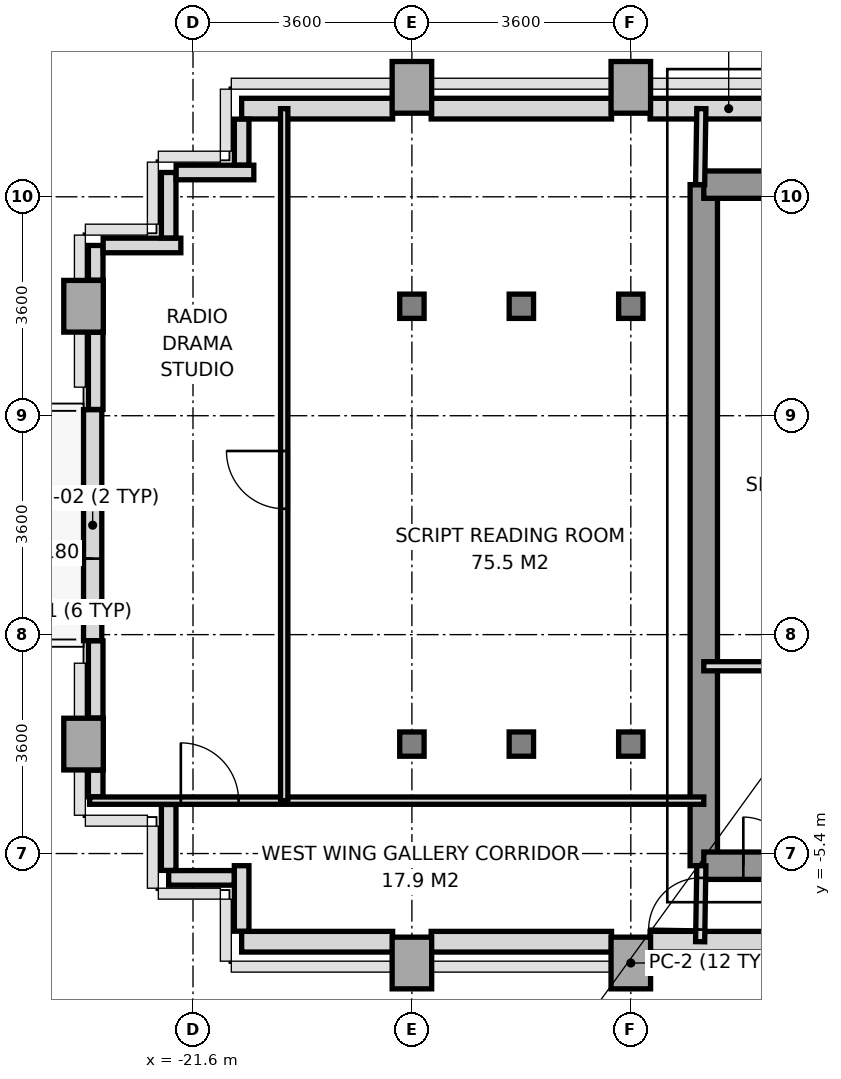
"""IFC4 building model, lengths in metres.
Left out: names, types, materials, properties, quantities, classifications, styles, units other than length and angle.
Written with IfcOpenShell. Run it as: python <this file> out.ifc"""

import sys

from ifc_helpers import new_model, si_unit, direction, frame, frame_2d, origin, origin_2d, place, context, subcontext, project, spatial, rectangle, i_section, extrude, source, transform, mapped, element, fill, save


model = new_model("IFC4")
c1 = context("Model", 3, precision=1e-05, world=origin(), true_north=direction((0.0, 1.0)))
c2 = subcontext(c1, "Body", "Model", "MODEL_VIEW")
j1 = project(units=[si_unit("LENGTHUNIT", "METRE"), si_unit("PLANEANGLEUNIT", "RADIAN")], contexts=[c1])
p1 = place(None, origin())
s1 = spatial("IfcSite", under=j1, at=p1, CompositionType="ELEMENT")
p2 = place(p1, origin())
s2 = spatial("IfcBuilding", under=s1, at=p2, CompositionType="ELEMENT")
p3 = place(p2, frame((0.0, 0.0, 107.4)))
s3 = spatial("IfcBuildingStorey", under=s2, at=p3, CompositionType="ELEMENT", Elevation=107.4)
m1 = source(origin(), c2, "Body", "SweptSolid", [
    extrude(rectangle(XDim=0.65, YDim=0.85, at=origin_2d()), origin(), (0.0, 0.0, 1.0), 3.2),
])
for number, where, z_axis, x_axis in (
    (1, (-23.4, -3.6, 0.0), (0.0, 0.0, 1.0), (1.0, 0.0, 0.0)),
    (2, (-23.4, 3.6, 0.0), (0.0, 0.0, 1.0), (1.0, 0.0, 0.0)),
    (3, (-18.0, -7.2, 0.0), (0.0, 0.0, 1.0), (1.0, 0.0, 0.0)),
):
    element("IfcColumn", number, at=place(p3, frame(where, z_axis=z_axis, x_axis=x_axis)), inside=s3, PredefinedType="COLUMN", context=c2, shape_type="MappedRepresentation", body=[
        mapped(m1, transform((0.0, 0.0, 0.0), x_axis=(1.0, 0.0, 0.0), y_axis=(0.0, 1.0, 0.0), z_axis=(0.0, 0.0, 1.0), scale=1.0)),
    ])
m2 = source(origin(), c2, "Body", "SweptSolid", [
    extrude(i_section(OverallWidth=0.401, OverallDepth=0.399, WebThickness=0.02, FlangeThickness=0.032, at=origin_2d()), origin(), (0.0, 0.0, 1.0), 3.2),
])
for number, where, z_axis, x_axis in (
    (4, (-18.0, -3.6, 0.0), (0.0, 0.0, 1.0), (1.0, 0.0, 0.0)),
    (5, (-18.0, 3.6, 0.0), (0.0, 0.0, 1.0), (1.0, 0.0, 0.0)),
):
    element("IfcColumn", number, at=place(p3, frame(where, z_axis=z_axis, x_axis=x_axis)), inside=s3, PredefinedType="COLUMN", context=c2, shape_type="MappedRepresentation", body=[
        mapped(m2, transform((0.0, 0.0, 0.0), x_axis=(1.0, 0.0, 0.0), y_axis=(0.0, 1.0, 0.0), z_axis=(0.0, 0.0, 1.0), scale=1.0)),
    ])
p4 = place(p3, frame((-18.0, 7.2, 0.0), z_axis=(0.0, 0.0, 1.0), x_axis=(1.0, 0.0, 0.0)))
e6 = element("IfcColumn", 6, at=p4, inside=s3, PredefinedType="COLUMN", context=c2, shape_type="MappedRepresentation", body=[
    mapped(m1, transform((0.0, 0.0, 0.0), x_axis=(1.0, 0.0, 0.0), y_axis=(0.0, 1.0, 0.0), z_axis=(0.0, 0.0, 1.0), scale=1.0)),
])
for number, where, z_axis, x_axis in (
    (7, (-16.2, -3.6, 0.0), (0.0, 0.0, 1.0), (1.0, 0.0, 0.0)),
    (8, (-16.2, 3.6, 0.0), (0.0, 0.0, 1.0), (1.0, 0.0, 0.0)),
):
    element("IfcColumn", number, at=place(p3, frame(where, z_axis=z_axis, x_axis=x_axis)), inside=s3, PredefinedType="COLUMN", context=c2, shape_type="MappedRepresentation", body=[
        mapped(m2, transform((0.0, 0.0, 0.0), x_axis=(1.0, 0.0, 0.0), y_axis=(0.0, 1.0, 0.0), z_axis=(0.0, 0.0, 1.0), scale=1.0)),
    ])
p5 = place(p3, frame((-14.4, -7.2, 0.0), z_axis=(0.0, 0.0, 1.0), x_axis=(1.0, 0.0, 0.0)))
e9 = element("IfcColumn", 9, at=p5, inside=s3, PredefinedType="COLUMN", context=c2, shape_type="MappedRepresentation", body=[
    mapped(m1, transform((0.0, 0.0, 0.0), x_axis=(1.0, 0.0, 0.0), y_axis=(0.0, 1.0, 0.0), z_axis=(0.0, 0.0, 1.0), scale=1.0)),
])
for number, where, z_axis, x_axis in (
    (10, (-14.4, -3.6, 0.0), (0.0, 0.0, 1.0), (1.0, 0.0, 0.0)),
    (11, (-14.4, 3.6, 0.0), (0.0, 0.0, 1.0), (1.0, 0.0, 0.0)),
):
    element("IfcColumn", number, at=place(p3, frame(where, z_axis=z_axis, x_axis=x_axis)), inside=s3, PredefinedType="COLUMN", context=c2, shape_type="MappedRepresentation", body=[
        mapped(m2, transform((0.0, 0.0, 0.0), x_axis=(1.0, 0.0, 0.0), y_axis=(0.0, 1.0, 0.0), z_axis=(0.0, 0.0, 1.0), scale=1.0)),
    ])
p6 = place(p3, frame((-14.4, 7.2, 0.0), z_axis=(0.0, 0.0, 1.0), x_axis=(1.0, 0.0, 0.0)))
e12 = element("IfcColumn", 12, at=p6, inside=s3, PredefinedType="COLUMN", context=c2, shape_type="MappedRepresentation", body=[
    mapped(m1, transform((0.0, 0.0, 0.0), x_axis=(1.0, 0.0, 0.0), y_axis=(0.0, 1.0, 0.0), z_axis=(0.0, 0.0, 1.0), scale=1.0)),
])
p7 = place(p3, frame((-20.8, 6.85, 0.0), z_axis=(0.0, 0.0, 1.0), x_axis=(1.0, 0.0, 0.0)))
e13 = element("IfcWall", 13, at=p7, inside=s3, PredefinedType="SOLIDWALL", context=c2, shape_type="SweptSolid", body=[
    extrude(rectangle(XDim=2.483, YDim=0.34, at=frame_2d((1.242, 0.0))), origin(), (0.0, 0.0, 1.0), 3.2),
])
p8 = place(p3, frame((-17.683, 6.85, 0.0), z_axis=(0.0, 0.0, 1.0), x_axis=(1.0, 0.0, 0.0)))
e14 = element("IfcWall", 14, at=p8, inside=s3, PredefinedType="SOLIDWALL", context=c2, shape_type="SweptSolid", body=[
    extrude(rectangle(XDim=2.966, YDim=0.34, at=frame_2d((1.483, 0.0))), origin(), (0.0, 0.0, 1.0), 2.45),
])
p9 = place(p3, frame((-14.083, 6.85, 0.0), z_axis=(0.0, 0.0, 1.0), x_axis=(1.0, 0.0, 0.0)))
e15 = element("IfcWall", 15, at=p9, inside=s3, PredefinedType="SOLIDWALL", context=c2, shape_type="SweptSolid", body=[
    extrude(rectangle(XDim=2.585, YDim=0.34, at=frame_2d((1.292, 0.0))), origin(), (0.0, 0.0, 1.0), 3.2),
])
p10 = place(p3, frame((-20.8, -6.85, 0.0), z_axis=(0.0, 0.0, 1.0), x_axis=(1.0, 0.0, 0.0)))
e16 = element("IfcWall", 16, at=p10, inside=s3, PredefinedType="SOLIDWALL", context=c2, shape_type="SweptSolid", body=[
    extrude(rectangle(XDim=2.483, YDim=0.34, at=frame_2d((1.242, 0.0))), origin(), (0.0, 0.0, 1.0), 3.2),
])
p11 = place(p3, frame((-17.683, -6.85, 0.0), z_axis=(0.0, 0.0, 1.0), x_axis=(1.0, 0.0, 0.0)))
e17 = element("IfcWall", 17, at=p11, inside=s3, PredefinedType="SOLIDWALL", context=c2, shape_type="SweptSolid", body=[
    extrude(rectangle(XDim=2.966, YDim=0.34, at=frame_2d((1.483, 0.0))), origin(), (0.0, 0.0, 1.0), 2.45),
])
p12 = place(p3, frame((-14.083, -6.85, 0.0), z_axis=(0.0, 0.0, 1.0), x_axis=(1.0, 0.0, 0.0)))
e18 = element("IfcWall", 18, at=p12, inside=s3, PredefinedType="SOLIDWALL", context=c2, shape_type="SweptSolid", body=[
    extrude(rectangle(XDim=2.333, YDim=0.34, at=frame_2d((1.167, 0.0))), origin(), (0.0, 0.0, 1.0), 3.2),
])
p13 = place(p3, frame((-23.25, -1.9, 0.0), z_axis=(0.0, 0.0, 1.0), x_axis=(0.0, 1.0, 0.0)))
e19 = element("IfcWall", 19, at=p13, inside=s3, PredefinedType="SOLIDWALL", context=c2, shape_type="SweptSolid", body=[
    extrude(rectangle(XDim=3.8, YDim=0.3, at=frame_2d((1.9, 0.0))), origin(), (0.0, 0.0, 1.0), 2.45),
])
p14 = place(p13, frame((1.35, 0.0, 0.0)))
e20 = element("IfcOpeningElement", 20, at=p14, cuts=e19, PredefinedType="OPENING", context=c2, shape_type="SweptSolid", body=[
    extrude(rectangle(XDim=1.1, YDim=2.3, at=frame_2d((0.55, 1.15))), frame((0.0, 0.16, 0.0), z_axis=(0.0, -1.0, 0.0), x_axis=(1.0, 0.0, 0.0)), (0.0, 0.0, 1.0), 0.32),
])
for number, where, z_axis, x_axis in (
    (21, (-20.8, -6.677, 0.0), (0.0, 0.0, 1.0), (0.0, 1.0, 0.0)),
    (22, (-20.923, -5.8, 0.0), (0.0, 0.0, 1.0), (-1.0, 0.0, 0.0)),
):
    element("IfcWall", number, at=place(p3, frame(where, z_axis=z_axis, x_axis=x_axis)), inside=s3, PredefinedType="PARAPET", context=c2, shape_type="SweptSolid", body=[
        extrude(rectangle(XDim=1.077, YDim=0.24, at=frame_2d((0.539, 0.0))), origin(), (0.0, 0.0, 1.0), 1.15),
    ])
p15 = place(p3, frame((-22.0, -5.677, 0.0), z_axis=(0.0, 0.0, 1.0), x_axis=(0.0, 1.0, 0.0)))
e23 = element("IfcWall", 23, at=p15, inside=s3, PredefinedType="PARAPET", context=c2, shape_type="SweptSolid", body=[
    extrude(rectangle(XDim=1.084, YDim=0.24, at=frame_2d((0.542, 0.0))), origin(), (0.0, 0.0, 1.0), 1.15),
])
p16 = place(p3, frame((-23.2, -4.467, 0.0), z_axis=(0.0, 0.0, 1.0), x_axis=(0.0, 1.0, 0.0)))
e24 = element("IfcWall", 24, at=p16, inside=s3, PredefinedType="PARAPET", context=c2, shape_type="SweptSolid", body=[
    extrude(rectangle(XDim=0.439, YDim=0.24, at=frame_2d((0.219, 0.0))), origin(), (0.0, 0.0, 1.0), 1.15),
])
for number, where, z_axis, x_axis in (
    (25, (-23.2, -3.172, 0.0), (0.0, 0.0, 1.0), (0.0, 1.0, 0.0)),
    (26, (-23.2, 1.903, 0.0), (0.0, 0.0, 1.0), (0.0, 1.0, 0.0)),
):
    element("IfcWall", number, at=place(p3, frame(where, z_axis=z_axis, x_axis=x_axis)), inside=s3, PredefinedType="PARAPET", context=c2, shape_type="SweptSolid", body=[
        extrude(rectangle(XDim=1.269, YDim=0.24, at=frame_2d((0.635, 0.0))), origin(), (0.0, 0.0, 1.0), 1.15),
    ])
p17 = place(p3, frame((-23.2, 4.028, 0.0), z_axis=(0.0, 0.0, 1.0), x_axis=(0.0, 1.0, 0.0)))
e27 = element("IfcWall", 27, at=p17, inside=s3, PredefinedType="PARAPET", context=c2, shape_type="SweptSolid", body=[
    extrude(rectangle(XDim=0.572, YDim=0.24, at=frame_2d((0.286, 0.0))), origin(), (0.0, 0.0, 1.0), 1.15),
])
p18 = place(p3, frame((-23.077, 4.6, 0.0), z_axis=(0.0, 0.0, 1.0), x_axis=(1.0, 0.0, 0.0)))
e28 = element("IfcWall", 28, at=p18, inside=s3, PredefinedType="PARAPET", context=c2, shape_type="SweptSolid", body=[
    extrude(rectangle(XDim=1.277, YDim=0.24, at=frame_2d((0.638, 0.0))), origin(), (0.0, 0.0, 1.0), 1.15),
])
p19 = place(p3, frame((-22.0, 4.723, 0.0), z_axis=(0.0, 0.0, 1.0), x_axis=(0.0, 1.0, 0.0)))
e29 = element("IfcWall", 29, at=p19, inside=s3, PredefinedType="PARAPET", context=c2, shape_type="SweptSolid", body=[
    extrude(rectangle(XDim=1.077, YDim=0.24, at=frame_2d((0.539, 0.0))), origin(), (0.0, 0.0, 1.0), 1.15),
])
p20 = place(p3, frame((-21.877, 5.8, 0.0), z_axis=(0.0, 0.0, 1.0), x_axis=(1.0, 0.0, 0.0)))
e30 = element("IfcWall", 30, at=p20, inside=s3, PredefinedType="PARAPET", context=c2, shape_type="SweptSolid", body=[
    extrude(rectangle(XDim=1.277, YDim=0.24, at=frame_2d((0.638, 0.0))), origin(), (0.0, 0.0, 1.0), 1.15),
])
p21 = place(p3, frame((-20.8, 5.923, 0.0), z_axis=(0.0, 0.0, 1.0), x_axis=(0.0, 1.0, 0.0)))
e31 = element("IfcWall", 31, at=p21, inside=s3, PredefinedType="PARAPET", context=c2, shape_type="SweptSolid", body=[
    extrude(rectangle(XDim=0.754, YDim=0.24, at=frame_2d((0.377, 0.0))), origin(), (0.0, 0.0, 1.0), 1.15),
])
p22 = place(p3, frame((-13.2, -5.6, 0.0), z_axis=(0.0, 0.0, 1.0), x_axis=(0.0, 1.0, 0.0)))
e32 = element("IfcWall", 32, at=p22, inside=s3, PredefinedType="SHEAR", context=c2, shape_type="SweptSolid", body=[
    extrude(rectangle(XDim=11.2, YDim=0.45, at=frame_2d((5.6, 0.0))), origin(), (0.0, 0.0, 1.0), 3.2),
])
p23 = place(p3, frame((-13.2, 5.6, 0.0), z_axis=(0.0, 0.0, 1.0), x_axis=(1.0, 0.0, 0.0)))
e33 = element("IfcWall", 33, at=p23, inside=s3, PredefinedType="SHEAR", context=c2, shape_type="SweptSolid", body=[
    extrude(rectangle(XDim=1.819, YDim=0.45, at=frame_2d((0.909, 0.0))), origin(), (0.0, 0.0, 1.0), 3.2),
])
p24 = place(p3, frame((-13.2, -5.6, 0.0), z_axis=(0.0, 0.0, 1.0), x_axis=(1.0, 0.0, 0.0)))
e34 = element("IfcWall", 34, at=p24, inside=s3, PredefinedType="SHEAR", context=c2, shape_type="SweptSolid", body=[
    extrude(rectangle(XDim=7.8, YDim=0.45, at=frame_2d((3.9, 0.0))), origin(), (0.0, 0.0, 1.0), 3.2),
])
p25 = place(p24, frame((3.6, 0.0, 0.0)))
e35 = element("IfcOpeningElement", 35, at=p25, cuts=e34, PredefinedType="OPENING", context=c2, shape_type="SweptSolid", body=[
    extrude(rectangle(XDim=1.2, YDim=2.2, at=frame_2d((0.6, 1.1))), frame((0.0, 0.235, 0.0), z_axis=(0.0, -1.0, 0.0), x_axis=(1.0, 0.0, 0.0)), (0.0, 0.0, 1.0), 0.47),
])
p26 = place(p24, frame((0.65, 0.0, 0.0)))
e36 = element("IfcOpeningElement", 36, at=p26, cuts=e34, PredefinedType="OPENING", context=c2, shape_type="SweptSolid", body=[
    extrude(rectangle(XDim=0.8, YDim=2.1, at=frame_2d((0.4, 1.05))), frame((0.0, 0.235, 0.0), z_axis=(0.0, -1.0, 0.0), x_axis=(1.0, 0.0, 0.0)), (0.0, 0.0, 1.0), 0.47),
])
p27 = place(p3, frame((-13.2, -2.32, 0.0), z_axis=(0.0, 0.0, 1.0), x_axis=(1.0, 0.0, 0.0)))
e37 = element("IfcWall", 37, at=p27, inside=s3, PredefinedType="PARTITIONING", context=c2, shape_type="SweptSolid", body=[
    extrude(rectangle(XDim=2.18, YDim=0.15, at=frame_2d((1.09, 0.0))), origin(), (0.0, 0.0, 1.0), 3.2),
])
p28 = place(p3, frame((-13.26, 5.6, 0.0), z_axis=(0.0, 0.0, 1.0), x_axis=(0.016013571389, 0.999871774545, 0.0)))
e38 = element("IfcWall", 38, at=p28, inside=s3, PredefinedType="PARTITIONING", context=c2, shape_type="SweptSolid", body=[
    extrude(rectangle(XDim=1.25, YDim=0.15, at=frame_2d((0.625, 0.0))), origin(), (0.0, 0.0, 1.0), 3.2),
])
p29 = place(p3, frame((-13.26, -6.85, 0.0), z_axis=(0.0, 0.0, 1.0), x_axis=(0.016013571389, 0.999871774545, 0.0)))
e39 = element("IfcWall", 39, at=p29, inside=s3, PredefinedType="PARTITIONING", context=c2, shape_type="SweptSolid", body=[
    extrude(rectangle(XDim=1.25, YDim=0.15, at=frame_2d((0.625, 0.0))), origin(), (0.0, 0.0, 1.0), 3.2),
])
p30 = place(p29, frame((0.2, 0.0, 0.0)))
e40 = element("IfcOpeningElement", 40, at=p30, cuts=e39, PredefinedType="OPENING", context=c2, shape_type="SweptSolid", body=[
    extrude(rectangle(XDim=0.85, YDim=2.1, at=frame_2d((0.425, 1.05))), frame((0.0, 0.085, 0.0), z_axis=(0.0, -1.0, 0.0), x_axis=(1.0, 0.0, 0.0)), (0.0, 0.0, 1.0), 0.17),
])
p31 = place(p3, frame((-23.3, -4.53, 0.0), z_axis=(0.0, 0.0, 1.0), x_axis=(1.0, 0.0, 0.0)))
e41 = element("IfcWall", 41, at=p31, inside=s3, PredefinedType="PARTITIONING", context=c2, shape_type="SweptSolid", body=[
    extrude(rectangle(XDim=10.1, YDim=0.12, at=frame_2d((5.05, 0.0))), origin(), (0.0, 0.0, 1.0), 2.75),
])
p32 = place(p31, frame((1.5, 0.0, 0.0)))
e42 = element("IfcOpeningElement", 42, at=p32, cuts=e41, PredefinedType="OPENING", context=c2, shape_type="SweptSolid", body=[
    extrude(rectangle(XDim=0.95, YDim=2.15, at=frame_2d((0.475, 1.075))), frame((0.0, 0.07, 0.0), z_axis=(0.0, -1.0, 0.0), x_axis=(1.0, 0.0, 0.0)), (0.0, 0.0, 1.0), 0.14),
])
p33 = place(p3, frame((-20.1, -4.53, 0.0), z_axis=(0.0, 0.0, 1.0), x_axis=(0.0, 1.0, 0.0)))
e43 = element("IfcWall", 43, at=p33, inside=s3, PredefinedType="PARTITIONING", context=c2, shape_type="SweptSolid", body=[
    extrude(rectangle(XDim=11.38, YDim=0.12, at=frame_2d((5.69, 0.0))), origin(), (0.0, 0.0, 1.0), 2.7),
])
p34 = place(p33, frame((4.8, 0.0, 0.0)))
e44 = element("IfcOpeningElement", 44, at=p34, cuts=e43, PredefinedType="OPENING", context=c2, shape_type="SweptSolid", body=[
    extrude(rectangle(XDim=0.95, YDim=2.15, at=frame_2d((0.475, 1.075))), frame((0.0, 0.07, 0.0), z_axis=(0.0, -1.0, 0.0), x_axis=(1.0, 0.0, 0.0)), (0.0, 0.0, 1.0), 0.14),
])
m3 = source(origin(), c2, "Body", "SweptSolid", [
    extrude(rectangle(XDim=1.1, YDim=2.3, at=frame_2d((0.55, 1.15))), frame((0.0, 0.025, 0.0), z_axis=(0.0, -1.0, 0.0), x_axis=(1.0, 0.0, 0.0)), (0.0, 0.0, 1.0), 0.05),
])
p35 = place(p14, origin())
e45 = element("IfcDoor", 45, at=p35, inside=s3, OperationType="SINGLE_SWING_LEFT", PredefinedType="DOOR", context=c2, shape_type="MappedRepresentation", body=[
    mapped(m3, transform((0.0, 0.0, 0.0), x_axis=(1.0, 0.0, 0.0), y_axis=(0.0, 1.0, 0.0), z_axis=(0.0, 0.0, 1.0), scale=1.0)),
])
fill(e20, e45)
m4 = source(origin(), c2, "Body", "SweptSolid", [
    extrude(rectangle(XDim=0.8, YDim=2.1, at=frame_2d((0.4, 1.05))), frame((0.0, 0.025, 0.0), z_axis=(0.0, -1.0, 0.0), x_axis=(1.0, 0.0, 0.0)), (0.0, 0.0, 1.0), 0.05),
])
p36 = place(p26, origin())
e46 = element("IfcDoor", 46, at=p36, inside=s3, OperationType="SINGLE_SWING_LEFT", PredefinedType="DOOR", context=c2, shape_type="MappedRepresentation", body=[
    mapped(m4, transform((0.0, 0.0, 0.0), x_axis=(1.0, 0.0, 0.0), y_axis=(0.0, 1.0, 0.0), z_axis=(0.0, 0.0, 1.0), scale=1.0)),
])
fill(e36, e46)
m5 = source(origin(), c2, "Body", "SweptSolid", [
    extrude(rectangle(XDim=0.85, YDim=2.1, at=frame_2d((0.425, 1.05))), frame((0.0, 0.025, 0.0), z_axis=(0.0, -1.0, 0.0), x_axis=(1.0, 0.0, 0.0)), (0.0, 0.0, 1.0), 0.05),
])
p37 = place(p30, origin())
e47 = element("IfcDoor", 47, at=p37, inside=s3, OperationType="SINGLE_SWING_LEFT", PredefinedType="DOOR", context=c2, shape_type="MappedRepresentation", body=[
    mapped(m5, transform((0.0, 0.0, 0.0), x_axis=(1.0, 0.0, 0.0), y_axis=(0.0, 1.0, 0.0), z_axis=(0.0, 0.0, 1.0), scale=1.0)),
])
fill(e40, e47)
m6 = source(origin(), c2, "Body", "SweptSolid", [
    extrude(rectangle(XDim=0.95, YDim=2.15, at=frame_2d((0.475, 1.075))), frame((0.0, 0.025, 0.0), z_axis=(0.0, -1.0, 0.0), x_axis=(1.0, 0.0, 0.0)), (0.0, 0.0, 1.0), 0.05),
])
p38 = place(p32, origin())
e48 = element("IfcDoor", 48, at=p38, inside=s3, OperationType="SINGLE_SWING_LEFT", PredefinedType="DOOR", context=c2, shape_type="MappedRepresentation", body=[
    mapped(m6, transform((0.0, 0.0, 0.0), x_axis=(1.0, 0.0, 0.0), y_axis=(0.0, 1.0, 0.0), z_axis=(0.0, 0.0, 1.0), scale=1.0)),
])
fill(e42, e48)
p39 = place(p34, origin())
e49 = element("IfcDoor", 49, at=p39, inside=s3, OperationType="SINGLE_SWING_RIGHT", PredefinedType="DOOR", context=c2, shape_type="MappedRepresentation", body=[
    mapped(m6, transform((0.0, 0.0, 0.0), x_axis=(1.0, 0.0, 0.0), y_axis=(0.0, 1.0, 0.0), z_axis=(0.0, 0.0, 1.0), scale=1.0)),
])
fill(e44, e49)
save(model, sys.argv[1])
